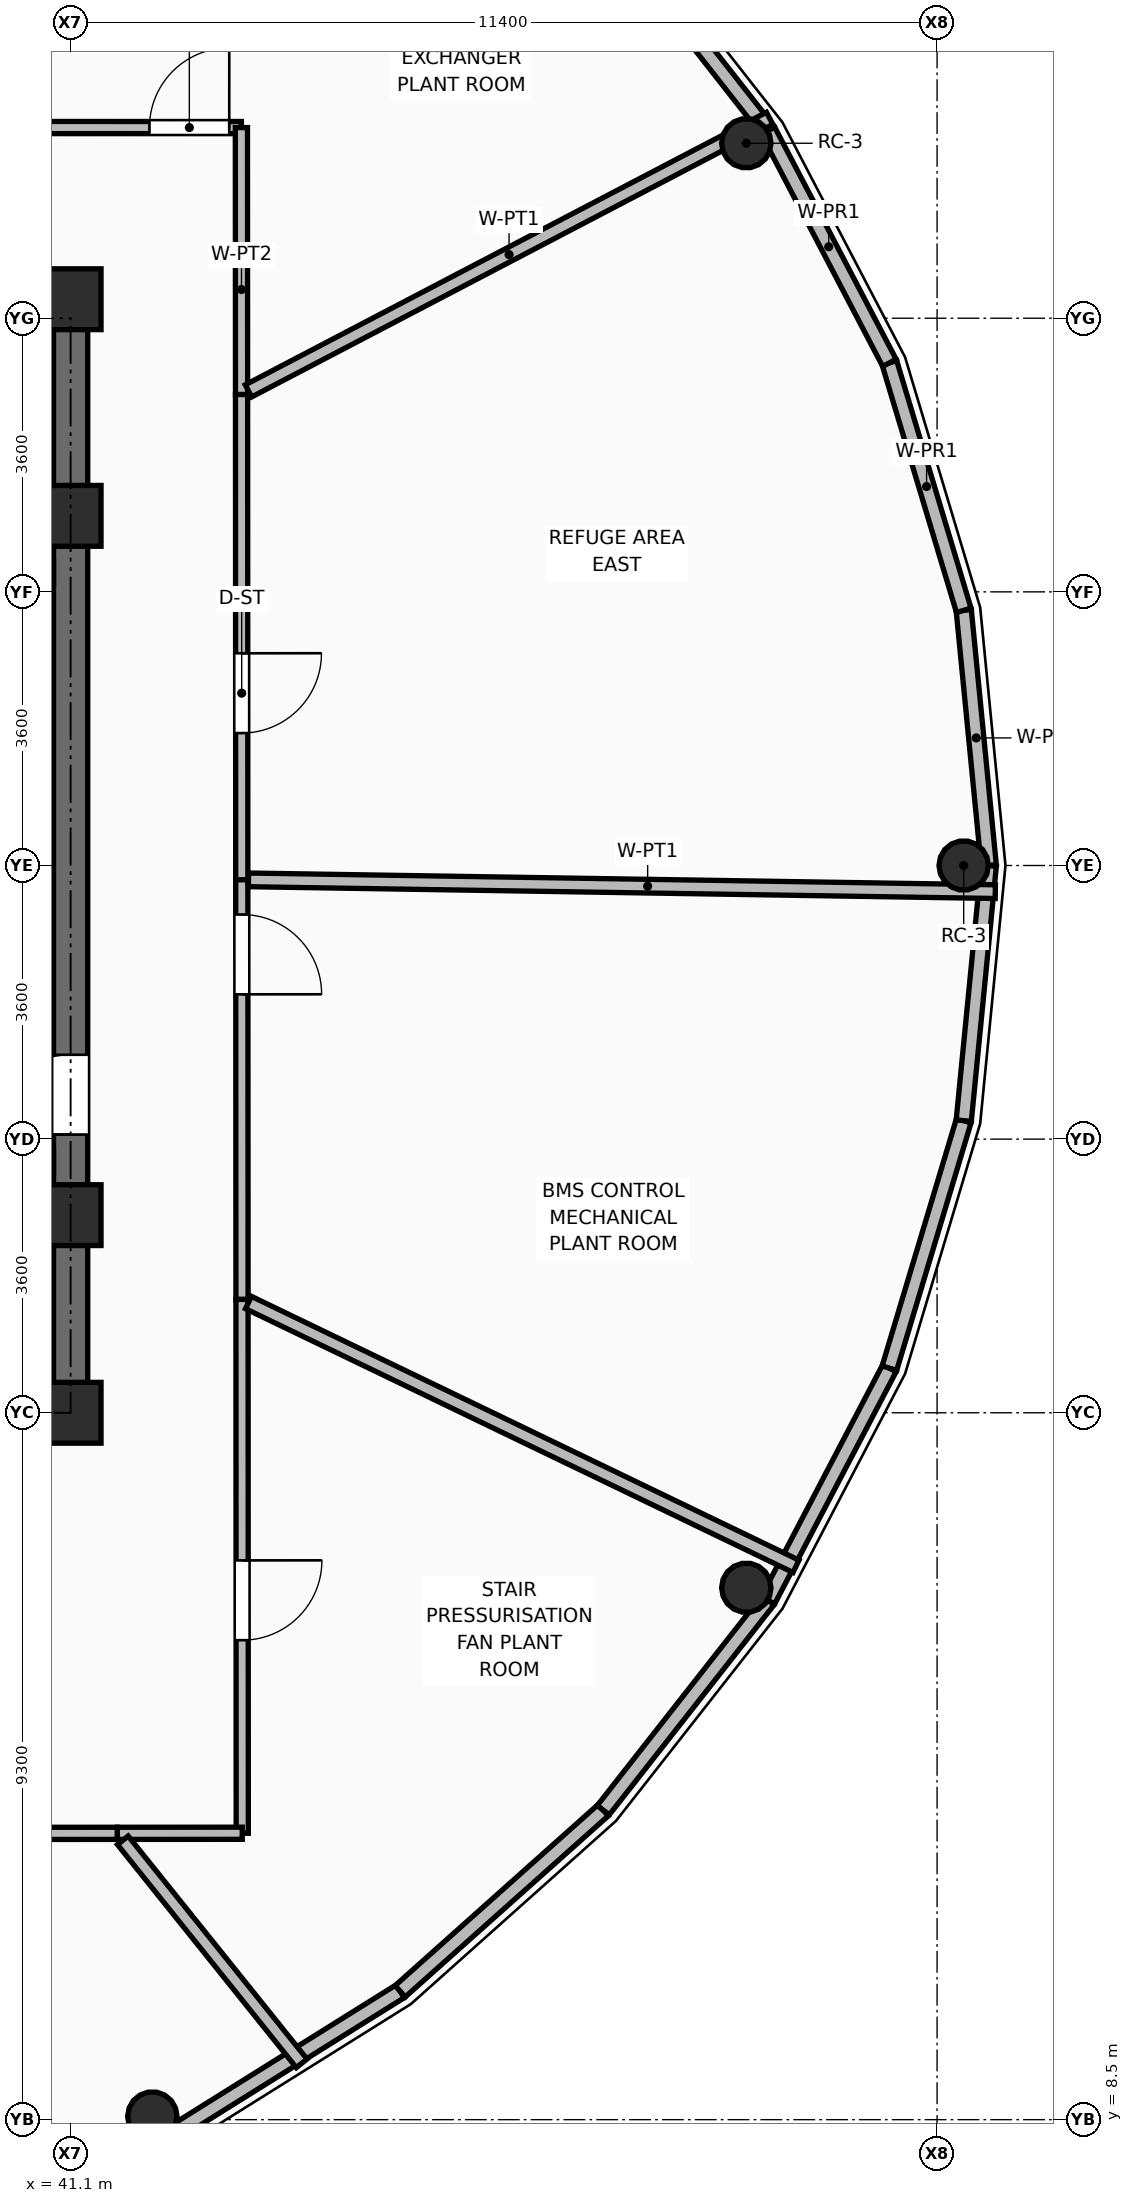
"""IFC4 building model, lengths in metres.
Left out: names, types, materials, properties, quantities, classifications, styles, units other than length and angle.
Written with IfcOpenShell. Run it as: python <this file> out.ifc"""

import sys

from ifc_helpers import new_model, si_unit, direction, frame, frame_2d, origin, origin_2d, place, context, subcontext, project, spatial, rectangle, hollow_circle, extrude, element, fill, save


model = new_model("IFC4")
c1 = context("Model", 3, precision=1e-05, world=origin(), true_north=direction((0.0, 1.0)))
c2 = subcontext(c1, "Body", "Model", "MODEL_VIEW")
j1 = project(units=[si_unit("LENGTHUNIT", "METRE"), si_unit("PLANEANGLEUNIT", "RADIAN")], contexts=[c1])
p1 = place(None, origin())
s1 = spatial("IfcSite", under=j1, at=p1, CompositionType="ELEMENT")
p2 = place(p1, origin())
s2 = spatial("IfcBuilding", under=s1, at=p2, CompositionType="ELEMENT")
p3 = place(p2, frame((0.0, 0.0, 253.65)))
s3 = spatial("IfcBuildingStorey", under=s2, at=p3, CompositionType="ELEMENT", Elevation=253.65)
for number, where, z_axis, x_axis in (
    (1, (41.1, 17.8, 0.0), (0.0, 0.0, 1.0), (1.0, 0.0, 0.0)),
    (2, (41.1, 20.4, 0.0), (0.0, 0.0, 1.0), (1.0, 0.0, 0.0)),
    (3, (41.1, 29.6, 0.0), (0.0, 0.0, 1.0), (1.0, 0.0, 0.0)),
    (4, (41.1, 32.45, 0.0), (0.0, 0.0, 1.0), (1.0, 0.0, 0.0)),
):
    element("IfcColumn", number, at=place(p3, frame(where, z_axis=z_axis, x_axis=x_axis)), inside=s3, PredefinedType="COLUMN", context=c2, shape_type="SweptSolid", body=[
        extrude(rectangle(XDim=0.8, YDim=0.8, at=origin_2d()), origin(), (0.0, 0.0, 1.0), 5.4),
    ])
p4 = place(p3, frame((52.85, 25.0, 0.0), z_axis=(-0.259059704906, 0.0, 0.965861309554), x_axis=(0.0, -1.0, 0.0)))
e5 = element("IfcColumn", 5, at=p4, inside=s3, PredefinedType="COLUMN", context=c2, shape_type="SweptSolid", body=[
    extrude(hollow_circle(Radius=0.325, WallThickness=0.03, at=origin_2d()), origin(), (0.0, 0.0, 1.0), 5.405),
])
p5 = place(p3, frame((49.99, 34.502, 0.0), z_axis=(-0.224793032222, -0.115835378923, 0.967496903175), x_axis=(0.458059425605, -0.888921572814, 0.0)))
e6 = element("IfcColumn", 6, at=p5, inside=s3, PredefinedType="COLUMN", context=c2, shape_type="SweptSolid", body=[
    extrude(hollow_circle(Radius=0.325, WallThickness=0.03, at=origin_2d()), origin(), (0.0, 0.0, 1.0), 5.396),
])
p6 = place(p3, frame((42.175, 8.542, 0.0), z_axis=(-0.130171994019, 0.201410172818, 0.970818826691), x_axis=(-0.839859571413, -0.542803740136, 0.0)))
e7 = element("IfcColumn", 7, at=p6, inside=s3, PredefinedType="COLUMN", context=c2, shape_type="SweptSolid", body=[
    extrude(hollow_circle(Radius=0.325, WallThickness=0.03, at=origin_2d()), origin(), (0.0, 0.0, 1.0), 5.377),
])
p7 = place(p3, frame((49.99, 15.498, 0.0), z_axis=(-0.224793032222, 0.115835378923, 0.967496903175), x_axis=(-0.458059425605, -0.888921572814, 0.0)))
e8 = element("IfcColumn", 8, at=p7, inside=s3, PredefinedType="COLUMN", context=c2, shape_type="SweptSolid", body=[
    extrude(hollow_circle(Radius=0.325, WallThickness=0.03, at=origin_2d()), origin(), (0.0, 0.0, 1.0), 5.396),
])
p8 = place(p3, frame((53.18, 25.0, 0.0), z_axis=(0.0, 0.0, 1.0), x_axis=(-0.097496920609, 0.995235826562, 0.0)))
e9 = element("IfcWall", 9, at=p8, inside=s3, PredefinedType="PARAPET", context=c2, shape_type="SweptSolid", body=[
    extrude(rectangle(XDim=3.373, YDim=0.2, at=frame_2d((1.687, 0.0))), origin(), (0.0, 0.0, 1.0), 1.12),
])
p9 = place(p3, frame((52.851, 28.357, 0.0), z_axis=(0.0, 0.0, 1.0), x_axis=(-0.287670684646, 0.957729386202, 0.0)))
e10 = element("IfcWall", 10, at=p9, inside=s3, PredefinedType="PARAPET", context=c2, shape_type="SweptSolid", body=[
    extrude(rectangle(XDim=3.4, YDim=0.2, at=frame_2d((1.7, 0.0))), origin(), (0.0, 0.0, 1.0), 1.12),
])
p10 = place(p3, frame((51.873, 31.613, 0.0), z_axis=(0.0, 0.0, 1.0), x_axis=(-0.463654949237, 0.886015850901, 0.0)))
e11 = element("IfcWall", 11, at=p10, inside=s3, PredefinedType="PARAPET", context=c2, shape_type="SweptSolid", body=[
    extrude(rectangle(XDim=3.447, YDim=0.2, at=frame_2d((1.723, 0.0))), origin(), (0.0, 0.0, 1.0), 1.12),
])
p11 = place(p3, frame((50.275, 34.667, 0.0), z_axis=(0.0, 0.0, 1.0), x_axis=(-0.617406744437, 0.786644082113, 0.0)))
e12 = element("IfcWall", 12, at=p11, inside=s3, PredefinedType="PARAPET", context=c2, shape_type="SweptSolid", body=[
    extrude(rectangle(XDim=3.51, YDim=0.2, at=frame_2d((1.755, 0.0))), origin(), (0.0, 0.0, 1.0), 1.12),
])
p12 = place(p3, frame((42.34, 8.256, 0.0), z_axis=(0.0, 0.0, 1.0), x_axis=(0.84825750298, 0.529583995828, 0.0)))
e13 = element("IfcWall", 13, at=p12, inside=s3, PredefinedType="PARAPET", context=c2, shape_type="SweptSolid", body=[
    extrude(rectangle(XDim=3.65, YDim=0.2, at=frame_2d((1.825, 0.0))), origin(), (0.0, 0.0, 1.0), 1.12),
])
p13 = place(p3, frame((45.436, 10.189, 0.0), z_axis=(0.0, 0.0, 1.0), x_axis=(0.74629085689, 0.665619979359, 0.0)))
e14 = element("IfcWall", 14, at=p13, inside=s3, PredefinedType="PARAPET", context=c2, shape_type="SweptSolid", body=[
    extrude(rectangle(XDim=3.58, YDim=0.2, at=frame_2d((1.79, 0.0))), origin(), (0.0, 0.0, 1.0), 1.12),
])
p14 = place(p3, frame((48.108, 12.572, 0.0), z_axis=(0.0, 0.0, 1.0), x_axis=(0.617406744437, 0.786644082113, 0.0)))
e15 = element("IfcWall", 15, at=p14, inside=s3, PredefinedType="PARAPET", context=c2, shape_type="SweptSolid", body=[
    extrude(rectangle(XDim=3.51, YDim=0.2, at=frame_2d((1.755, 0.0))), origin(), (0.0, 0.0, 1.0), 1.12),
])
p15 = place(p3, frame((50.275, 15.333, 0.0), z_axis=(0.0, 0.0, 1.0), x_axis=(0.463654949237, 0.886015850901, 0.0)))
e16 = element("IfcWall", 16, at=p15, inside=s3, PredefinedType="PARAPET", context=c2, shape_type="SweptSolid", body=[
    extrude(rectangle(XDim=3.447, YDim=0.2, at=frame_2d((1.723, 0.0))), origin(), (0.0, 0.0, 1.0), 1.12),
])
p16 = place(p3, frame((51.873, 18.387, 0.0), z_axis=(0.0, 0.0, 1.0), x_axis=(0.287670684646, 0.957729386202, 0.0)))
e17 = element("IfcWall", 17, at=p16, inside=s3, PredefinedType="PARAPET", context=c2, shape_type="SweptSolid", body=[
    extrude(rectangle(XDim=3.4, YDim=0.2, at=frame_2d((1.7, 0.0))), origin(), (0.0, 0.0, 1.0), 1.12),
])
p17 = place(p3, frame((52.851, 21.643, 0.0), z_axis=(0.0, 0.0, 1.0), x_axis=(0.097496920609, 0.995235826562, 0.0)))
e18 = element("IfcWall", 18, at=p17, inside=s3, PredefinedType="PARAPET", context=c2, shape_type="SweptSolid", body=[
    extrude(rectangle(XDim=3.373, YDim=0.2, at=frame_2d((1.687, 0.0))), origin(), (0.0, 0.0, 1.0), 1.12),
])
p18 = place(p3, frame((34.95, 17.8, 0.0), z_axis=(0.0, 0.0, 1.0), x_axis=(1.0, 0.0, 0.0)))
e19 = element("IfcWall", 19, at=p18, inside=s3, PredefinedType="SHEAR", context=c2, shape_type="SweptSolid", body=[
    extrude(rectangle(XDim=6.375, YDim=0.45, at=frame_2d((3.188, 0.0))), origin(), (0.0, 0.0, 1.0), 5.22),
])
p19 = place(p3, frame((21.675, 32.45, 0.0), z_axis=(0.0, 0.0, 1.0), x_axis=(1.0, 0.0, 0.0)))
e20 = element("IfcWall", 20, at=p19, inside=s3, PredefinedType="SHEAR", context=c2, shape_type="SweptSolid", body=[
    extrude(rectangle(XDim=19.65, YDim=0.45, at=frame_2d((9.825, 0.0))), origin(), (0.0, 0.0, 1.0), 5.22),
])
p20 = place(p19, frame((2.075, 0.0, 0.0)))
e21 = element("IfcOpeningElement", 21, at=p20, cuts=e20, PredefinedType="OPENING", context=c2, shape_type="SweptSolid", body=[
    extrude(rectangle(XDim=1.1, YDim=2.1, at=frame_2d((0.55, 1.05))), frame((0.0, 0.235, 0.0), z_axis=(0.0, -1.0, 0.0), x_axis=(1.0, 0.0, 0.0)), (0.0, 0.0, 1.0), 0.47),
])
p21 = place(p19, frame((15.465, 0.0, 0.0)))
e22 = element("IfcOpeningElement", 22, at=p21, cuts=e20, PredefinedType="OPENING", context=c2, shape_type="SweptSolid", body=[
    extrude(rectangle(XDim=1.0, YDim=2.1, at=frame_2d((0.5, 1.05))), frame((0.0, 0.235, 0.0), z_axis=(0.0, -1.0, 0.0), x_axis=(1.0, 0.0, 0.0)), (0.0, 0.0, 1.0), 0.47),
])
p22 = place(p19, frame((17.475, 0.0, 0.0)))
e23 = element("IfcOpeningElement", 23, at=p22, cuts=e20, PredefinedType="OPENING", context=c2, shape_type="SweptSolid", body=[
    extrude(rectangle(XDim=0.9, YDim=2.1, at=frame_2d((0.45, 1.05))), frame((0.0, 0.235, 0.0), z_axis=(0.0, -1.0, 0.0), x_axis=(1.0, 0.0, 0.0)), (0.0, 0.0, 1.0), 0.47),
])
p23 = place(p3, frame((41.1, 18.025, 0.0), z_axis=(0.0, 0.0, 1.0), x_axis=(0.0, 1.0, 0.0)))
e24 = element("IfcWall", 24, at=p23, inside=s3, PredefinedType="SHEAR", context=c2, shape_type="SweptSolid", body=[
    extrude(rectangle(XDim=14.2, YDim=0.45, at=frame_2d((7.1, 0.0))), origin(), (0.0, 0.0, 1.0), 5.22),
])
p24 = place(p23, frame((3.435, 0.0, 0.0)))
e25 = element("IfcOpeningElement", 25, at=p24, cuts=e24, PredefinedType="OPENING", context=c2, shape_type="SweptSolid", body=[
    extrude(rectangle(XDim=1.05, YDim=2.1, at=frame_2d((0.525, 1.05))), frame((0.0, 0.235, 0.0), z_axis=(0.0, -1.0, 0.0), x_axis=(1.0, 0.0, 0.0)), (0.0, 0.0, 1.0), 0.47),
])
for number, where, z_axis, x_axis in (
    (26, (37.21, 21.1, 0.0), (0.0, 0.0, 1.0), (1.0, 0.0, 0.0)),
    (27, (37.21, 28.85, 0.0), (0.0, 0.0, 1.0), (1.0, 0.0, 0.0)),
):
    element("IfcWall", number, at=place(p3, frame(where, z_axis=z_axis, x_axis=x_axis)), inside=s3, PredefinedType="SHEAR", context=c2, shape_type="SweptSolid", body=[
        extrude(rectangle(XDim=3.665, YDim=0.3, at=frame_2d((1.833, 0.0))), origin(), (0.0, 0.0, 1.0), 5.22),
    ])
p25 = place(p3, frame((39.288, 34.709, 0.0), z_axis=(0.0, 0.0, 1.0), x_axis=(0.999999971055, -0.000240601497, 0.0)))
e28 = element("IfcWall", 28, at=p25, inside=s3, PredefinedType="PARTITIONING", context=c2, shape_type="SweptSolid", body=[
    extrude(rectangle(XDim=4.059, YDim=0.16, at=frame_2d((2.029, 0.0))), origin(), (0.0, 0.0, 1.0), 4.733),
])
p26 = place(p25, frame((2.849, 0.0, 0.0)))
e29 = element("IfcOpeningElement", 29, at=p26, cuts=e28, PredefinedType="OPENING", context=c2, shape_type="SweptSolid", body=[
    extrude(rectangle(XDim=1.05, YDim=2.1, at=frame_2d((0.525, 1.05))), frame((0.0, 0.09, 0.0), z_axis=(0.0, -1.0, 0.0), x_axis=(1.0, 0.0, 0.0)), (0.0, 0.0, 1.0), 0.18),
])
p27 = place(p3, frame((43.347, 34.708, 0.0), z_axis=(0.0, 0.0, 1.0), x_axis=(0.000625651598, -0.99999980428, 0.0)))
e30 = element("IfcWall", 30, at=p27, inside=s3, PredefinedType="PARTITIONING", context=c2, shape_type="SweptSolid", body=[
    extrude(rectangle(XDim=3.512, YDim=0.16, at=frame_2d((1.756, 0.0))), origin(), (0.0, 0.0, 1.0), 4.733),
])
p28 = place(p3, frame((43.349, 31.196, 0.0), z_axis=(0.0, 0.0, 1.0), x_axis=(0.000458908514, -0.999999894701, 0.0)))
e31 = element("IfcWall", 31, at=p28, inside=s3, PredefinedType="PARTITIONING", context=c2, shape_type="SweptSolid", body=[
    extrude(rectangle(XDim=6.384, YDim=0.16, at=frame_2d((3.192, 0.0))), origin(), (0.0, 0.0, 1.0), 5.2),
])
p29 = place(p28, frame((3.404, 0.0, 0.0)))
e32 = element("IfcOpeningElement", 32, at=p29, cuts=e31, PredefinedType="OPENING", context=c2, shape_type="SweptSolid", body=[
    extrude(rectangle(XDim=1.05, YDim=2.1, at=frame_2d((0.525, 1.05))), frame((0.0, 0.09, 0.0), z_axis=(0.0, -1.0, 0.0), x_axis=(1.0, 0.0, 0.0)), (0.0, 0.0, 1.0), 0.18),
])
p30 = place(p3, frame((43.352, 24.812, 0.0), z_axis=(0.0, 0.0, 1.0), x_axis=(0.000530644659, -0.999999859208, 0.0)))
e33 = element("IfcWall", 33, at=p30, inside=s3, PredefinedType="PARTITIONING", context=c2, shape_type="SweptSolid", body=[
    extrude(rectangle(XDim=5.521, YDim=0.16, at=frame_2d((2.76, 0.0))), origin(), (0.0, 0.0, 1.0), 4.733),
])
p31 = place(p30, frame((0.457, 0.0, 0.0)))
e34 = element("IfcOpeningElement", 34, at=p31, cuts=e33, PredefinedType="OPENING", context=c2, shape_type="SweptSolid", body=[
    extrude(rectangle(XDim=1.05, YDim=2.1, at=frame_2d((0.525, 1.05))), frame((0.0, 0.09, 0.0), z_axis=(0.0, -1.0, 0.0), x_axis=(1.0, 0.0, 0.0)), (0.0, 0.0, 1.0), 0.18),
])
p32 = place(p3, frame((43.355, 19.291, 0.0), z_axis=(0.0, 0.0, 1.0), x_axis=(0.00041715911, -0.999999912989, 0.0)))
e35 = element("IfcWall", 35, at=p32, inside=s3, PredefinedType="PARTITIONING", context=c2, shape_type="SweptSolid", body=[
    extrude(rectangle(XDim=7.023, YDim=0.16, at=frame_2d((3.511, 0.0))), origin(), (0.0, 0.0, 1.0), 4.733),
])
p33 = place(p32, frame((3.433, 0.0, 0.0)))
e36 = element("IfcOpeningElement", 36, at=p33, cuts=e35, PredefinedType="OPENING", context=c2, shape_type="SweptSolid", body=[
    extrude(rectangle(XDim=1.05, YDim=2.1, at=frame_2d((0.525, 1.05))), frame((0.0, 0.09, 0.0), z_axis=(0.0, -1.0, 0.0), x_axis=(1.0, 0.0, 0.0)), (0.0, 0.0, 1.0), 0.18),
])
p34 = place(p3, frame((43.358, 12.268, 0.0), z_axis=(0.0, 0.0, 1.0), x_axis=(-0.999999823791, -0.000593647862, 0.0)))
e37 = element("IfcWall", 37, at=p34, inside=s3, PredefinedType="PARTITIONING", context=c2, shape_type="SweptSolid", body=[
    extrude(rectangle(XDim=1.645, YDim=0.16, at=frame_2d((0.823, 0.0))), origin(), (0.0, 0.0, 1.0), 5.2),
])
p35 = place(p3, frame((41.713, 12.267, 0.0), z_axis=(0.0, 0.0, 1.0), x_axis=(-0.999999888028, -0.000473226258, 0.0)))
e38 = element("IfcWall", 38, at=p35, inside=s3, PredefinedType="PARTITIONING", context=c2, shape_type="SweptSolid", body=[
    extrude(rectangle(XDim=6.707, YDim=0.16, at=frame_2d((3.354, 0.0))), origin(), (0.0, 0.0, 1.0), 4.733),
])
p36 = place(p35, frame((3.866, 0.0, 0.0)))
e39 = element("IfcOpeningElement", 39, at=p36, cuts=e38, PredefinedType="OPENING", context=c2, shape_type="SweptSolid", body=[
    extrude(rectangle(XDim=1.05, YDim=2.1, at=frame_2d((0.525, 1.05))), frame((0.0, 0.09, 0.0), z_axis=(0.0, -1.0, 0.0), x_axis=(1.0, 0.0, 0.0)), (0.0, 0.0, 1.0), 0.18),
])
p37 = place(p3, frame((43.44, 24.811, 0.0), z_axis=(0.0, 0.0, 1.0), x_axis=(0.999875563503, -0.015775218218, 0.0)))
e40 = element("IfcWall", 40, at=p37, inside=s3, PredefinedType="PARTITIONING", context=c2, shape_type="SweptSolid", body=[
    extrude(rectangle(XDim=9.827, YDim=0.18, at=frame_2d((4.914, 0.0))), origin(), (0.0, 0.0, 1.0), 4.575),
])
p38 = place(p3, frame((43.44, 31.244, 0.0), z_axis=(0.0, 0.0, 1.0), x_axis=(0.886132697357, 0.463431594385, 0.0)))
e41 = element("IfcWall", 41, at=p38, inside=s3, PredefinedType="PARTITIONING", context=c2, shape_type="SweptSolid", body=[
    extrude(rectangle(XDim=7.738, YDim=0.18, at=frame_2d((3.869, 0.0))), origin(), (0.0, 0.0, 1.0), 4.575),
])
p39 = place(p3, frame((39.353, 34.79, 0.0), z_axis=(0.0, 0.0, 1.0), x_axis=(0.62562461259, 0.780124249156, 0.0)))
e42 = element("IfcWall", 42, at=p39, inside=s3, PredefinedType="PARTITIONING", context=c2, shape_type="SweptSolid", body=[
    extrude(rectangle(XDim=7.651, YDim=0.18, at=frame_2d((3.826, 0.0))), origin(), (0.0, 0.0, 1.0), 4.575),
])
p40 = place(p3, frame((41.787, 12.175, 0.0), z_axis=(0.0, 0.0, 1.0), x_axis=(0.625589202781, -0.780152644912, 0.0)))
e43 = element("IfcWall", 43, at=p40, inside=s3, PredefinedType="PARTITIONING", context=c2, shape_type="SweptSolid", body=[
    extrude(rectangle(XDim=3.761, YDim=0.18, at=frame_2d((1.88, 0.0))), origin(), (0.0, 0.0, 1.0), 4.575),
])
p41 = place(p3, frame((43.44, 19.25, 0.0), z_axis=(0.0, 0.0, 1.0), x_axis=(0.900936685767, -0.433950559672, 0.0)))
e44 = element("IfcWall", 44, at=p41, inside=s3, PredefinedType="PARTITIONING", context=c2, shape_type="SweptSolid", body=[
    extrude(rectangle(XDim=7.996, YDim=0.18, at=frame_2d((3.998, 0.0))), origin(), (0.0, 0.0, 1.0), 4.575),
])
p42 = place(p24, origin())
e45 = element("IfcDoor", 45, at=p42, inside=s3, OperationType="SINGLE_SWING_LEFT", PredefinedType="DOOR", context=c2, shape_type="SweptSolid", body=[
    extrude(rectangle(XDim=1.05, YDim=2.1, at=frame_2d((0.525, 1.05))), frame((0.0, 0.025, 0.0), z_axis=(0.0, -1.0, 0.0), x_axis=(1.0, 0.0, 0.0)), (0.0, 0.0, 1.0), 0.05),
])
fill(e25, e45)
p43 = place(p29, origin())
e46 = element("IfcDoor", 46, at=p43, inside=s3, OperationType="SINGLE_SWING_LEFT", PredefinedType="DOOR", context=c2, shape_type="SweptSolid", body=[
    extrude(rectangle(XDim=1.05, YDim=2.1, at=frame_2d((0.525, 1.05))), frame((0.0, 0.025, 0.0), z_axis=(0.0, -1.0, 0.0), x_axis=(1.0, 0.0, 0.0)), (0.0, 0.0, 1.0), 0.05),
])
fill(e32, e46)
p44 = place(p26, origin())
e47 = element("IfcDoor", 47, at=p44, inside=s3, OperationType="SINGLE_SWING_RIGHT", PredefinedType="DOOR", context=c2, shape_type="SweptSolid", body=[
    extrude(rectangle(XDim=1.05, YDim=2.1, at=frame_2d((0.525, 1.05))), frame((0.0, 0.025, 0.0), z_axis=(0.0, -1.0, 0.0), x_axis=(1.0, 0.0, 0.0)), (0.0, 0.0, 1.0), 0.05),
])
fill(e29, e47)
p45 = place(p33, origin())
e48 = element("IfcDoor", 48, at=p45, inside=s3, OperationType="SINGLE_SWING_LEFT", PredefinedType="DOOR", context=c2, shape_type="SweptSolid", body=[
    extrude(rectangle(XDim=1.05, YDim=2.1, at=frame_2d((0.525, 1.05))), frame((0.0, 0.025, 0.0), z_axis=(0.0, -1.0, 0.0), x_axis=(1.0, 0.0, 0.0)), (0.0, 0.0, 1.0), 0.05),
])
fill(e36, e48)
p46 = place(p31, origin())
e49 = element("IfcDoor", 49, at=p46, inside=s3, OperationType="SINGLE_SWING_RIGHT", PredefinedType="DOOR", context=c2, shape_type="SweptSolid", body=[
    extrude(rectangle(XDim=1.05, YDim=2.1, at=frame_2d((0.525, 1.05))), frame((0.0, 0.025, 0.0), z_axis=(0.0, -1.0, 0.0), x_axis=(1.0, 0.0, 0.0)), (0.0, 0.0, 1.0), 0.05),
])
fill(e34, e49)
save(model, sys.argv[1])
